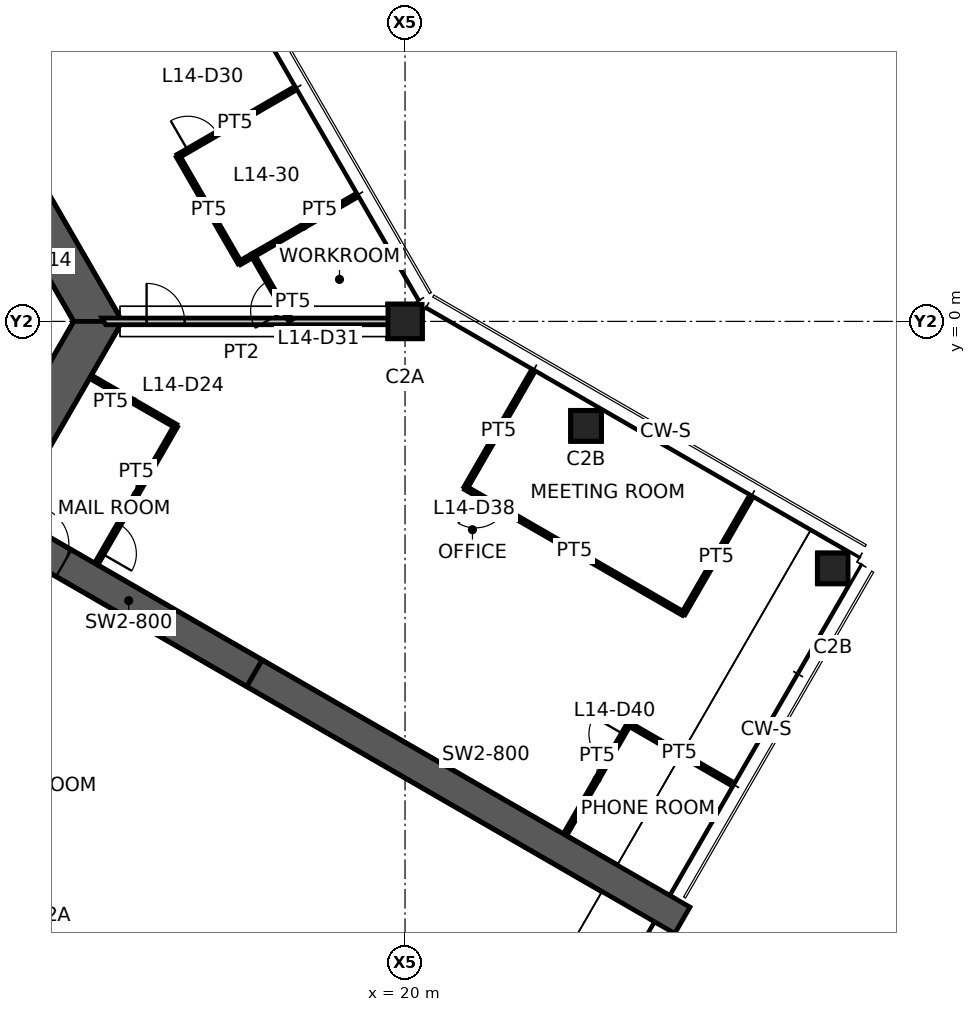
"""IFC4 building model, lengths in metres.
Left out: names, types, materials, properties, quantities, classifications, styles, units other than length and angle.
Written with IfcOpenShell. Run it as: python <this file> out.ifc"""

import sys

from ifc_helpers import new_model, si_unit, direction, frame, frame_2d, origin, origin_2d, place, context, subcontext, project, spatial, polyline, rectangle, hollow_rectangle, outline, extrude, element, fill, save


model = new_model("IFC4")
c1 = context("Model", 3, precision=1e-05, world=origin(), true_north=direction((0.0, 1.0)))
c2 = subcontext(c1, "Body", "Model", "MODEL_VIEW")
j1 = project(units=[si_unit("LENGTHUNIT", "METRE"), si_unit("PLANEANGLEUNIT", "RADIAN")], contexts=[c1])
p1 = place(None, origin())
s1 = spatial("IfcSite", under=j1, at=p1, CompositionType="ELEMENT")
p2 = place(p1, origin())
s2 = spatial("IfcBuilding", under=s1, at=p2, CompositionType="ELEMENT")
p3 = place(p2, frame((0.0, 0.0, 57.0)))
s3 = spatial("IfcBuildingStorey", under=s2, at=p3, CompositionType="ELEMENT", Elevation=57.0)
p4 = place(p3, frame((20.0, 0.0, 0.0), z_axis=(0.0, 0.0, 1.0), x_axis=(1.0, 0.0, 0.0)))
e1 = element("IfcColumn", 1, at=p4, inside=s3, PredefinedType="COLUMN", context=c2, shape_type="SweptSolid", body=[
    extrude(hollow_rectangle(XDim=0.9, YDim=0.9, WallThickness=0.055, at=origin_2d()), origin(), (0.0, 0.0, 1.0), 4.2),
])
for number, where, z_axis, x_axis in (
    (2, (24.763, -2.75, 0.0), (0.0, 0.0, 1.0), (1.0, 0.0, 0.0)),
    (3, (31.258, -6.5, 0.0), (0.0, 0.0, 1.0), (1.0, 0.0, 0.0)),
):
    element("IfcColumn", number, at=place(p3, frame(where, z_axis=z_axis, x_axis=x_axis)), inside=s3, PredefinedType="COLUMN", context=c2, shape_type="SweptSolid", body=[
        extrude(hollow_rectangle(XDim=0.8, YDim=0.8, WallThickness=0.045, at=origin_2d()), origin(), (0.0, 0.0, 1.0), 4.2),
    ])
p5 = place(p3, frame((11.922, 0.0, 0.0), z_axis=(0.0, 0.0, 1.0), x_axis=(-0.500004296715, 0.866022923061, 0.0)))
e4 = element("IfcWall", 4, at=p5, inside=s3, PredefinedType="SHEAR", context=c2, shape_type="SweptSolid", body=[
    extrude(outline(polyline([(-0.318, -0.55), (5.835, -0.55), (6.635, -0.55), (12.24, -0.55), (11.605, 0.55), (6.635, 0.55), (5.835, 0.55), (0.318, 0.55), (-0.318, -0.55)])), origin(), (0.0, 0.0, 1.0), 4.2),
])
p6 = place(p5, frame((5.835, 0.0, 0.0)))
e5 = element("IfcOpeningElement", 5, at=p6, cuts=e4, PredefinedType="OPENING", context=c2, shape_type="SweptSolid", body=[
    extrude(rectangle(XDim=0.8, YDim=2.1, at=frame_2d((0.4, 1.05))), frame((0.0, 0.56, 0.0), z_axis=(0.0, -1.0, 0.0), x_axis=(1.0, 0.0, 0.0)), (0.0, 0.0, 1.0), 1.12),
])
p7 = place(p3, frame((5.961, -10.325, 0.0), z_axis=(0.0, 0.0, 1.0), x_axis=(0.500004296715, 0.866022923061, 0.0)))
e6 = element("IfcWall", 6, at=p7, inside=s3, PredefinedType="SHEAR", context=c2, shape_type="SweptSolid", body=[
    extrude(outline(polyline([(-0.318, -0.55), (4.594, -0.55), (5.394, -0.55), (12.24, -0.55), (11.605, 0.55), (5.394, 0.55), (4.594, 0.55), (0.318, 0.55), (-0.318, -0.55)])), origin(), (0.0, 0.0, 1.0), 4.2),
])
p8 = place(p7, frame((4.594, 0.0, 0.0)))
e7 = element("IfcOpeningElement", 7, at=p8, cuts=e6, PredefinedType="OPENING", context=c2, shape_type="SweptSolid", body=[
    extrude(rectangle(XDim=0.8, YDim=2.1, at=frame_2d((0.4, 1.05))), frame((0.0, 0.56, 0.0), z_axis=(0.0, -1.0, 0.0), x_axis=(1.0, 0.0, 0.0)), (0.0, 0.0, 1.0), 1.12),
])
p9 = place(p3, frame((9.418, -5.438, 0.0), z_axis=(0.0, 0.0, 1.0), x_axis=(0.866029782078, -0.499992416496, 0.0)))
e8 = element("IfcWall", 8, at=p9, inside=s3, PredefinedType="SHEAR", context=c2, shape_type="SweptSolid", body=[
    extrude(rectangle(XDim=7.646, YDim=0.8, at=frame_2d((3.823, 0.0))), origin(), (0.0, 0.0, 1.0), 4.2),
])
p10 = place(p9, frame((0.85, 0.0, 0.0)))
e9 = element("IfcOpeningElement", 9, at=p10, cuts=e8, PredefinedType="OPENING", context=c2, shape_type="SweptSolid", body=[
    extrude(rectangle(XDim=1.0, YDim=2.1, at=frame_2d((0.5, 1.05))), frame((0.0, 0.41, 0.0), z_axis=(0.0, -1.0, 0.0), x_axis=(1.0, 0.0, 0.0)), (0.0, 0.0, 1.0), 0.82),
])
p11 = place(p3, frame((16.039, -9.26, 0.0), z_axis=(0.0, 0.0, 1.0), x_axis=(0.866024837091, -0.50000098154, 0.0)))
e10 = element("IfcWall", 10, at=p11, inside=s3, PredefinedType="SHEAR", context=c2, shape_type="SweptSolid", body=[
    extrude(rectangle(XDim=13.0, YDim=0.8, at=frame_2d((6.5, 0.0))), origin(), (0.0, 0.0, 1.0), 4.2),
])
p12 = place(p3, frame((12.072, 0.0, 0.0), z_axis=(0.0, 0.0, 1.0), x_axis=(1.0, 0.0, 0.0)))
e11 = element("IfcWall", 11, at=p12, inside=s3, PredefinedType="PARTITIONING", context=c2, shape_type="SweptSolid", body=[
    extrude(outline(polyline([(0.051, -0.087), (1.127, -0.087), (2.127, -0.087), (7.928, -0.087), (7.928, 0.087), (2.127, 0.087), (1.127, 0.087), (-0.051, 0.087), (0.051, -0.087)])), origin(), (0.0, 0.0, 1.0), 3.35),
])
p13 = place(p12, frame((1.127, 0.0, 0.0)))
e12 = element("IfcOpeningElement", 12, at=p13, cuts=e11, PredefinedType="OPENING", context=c2, shape_type="SweptSolid", body=[
    extrude(rectangle(XDim=1.0, YDim=2.1, at=frame_2d((0.5, 1.05))), frame((0.0, 0.098, 0.0), z_axis=(0.0, -1.0, 0.0), x_axis=(1.0, 0.0, 0.0)), (0.0, 0.0, 1.0), 0.195),
])
p14 = place(p3, frame((11.143, 8.05, 0.0), z_axis=(0.0, 0.0, 1.0), x_axis=(-0.86603494908, -0.499983466698, 0.0)))
e13 = element("IfcWall", 13, at=p14, inside=s3, PredefinedType="PARTITIONING", context=c2, shape_type="SweptSolid", body=[
    extrude(rectangle(XDim=2.78, YDim=0.1, at=frame_2d((1.39, 0.0))), origin(), (0.0, 0.0, 1.0), 3.25),
])
p15 = place(p3, frame((18.662, 3.277, 0.0), z_axis=(0.0, 0.0, 1.0), x_axis=(-0.866023484601, -0.500003324108, 0.0)))
e14 = element("IfcWall", 14, at=p15, inside=s3, PredefinedType="PARTITIONING", context=c2, shape_type="SweptSolid", body=[
    extrude(rectangle(XDim=3.085, YDim=0.1, at=frame_2d((1.542, 0.0))), origin(), (0.0, 0.0, 1.0), 3.25),
])
p16 = place(p3, frame((14.025, 4.349, 0.0), z_axis=(0.0, 0.0, 1.0), x_axis=(0.866043818878, 0.499968102766, 0.0)))
e15 = element("IfcWall", 15, at=p16, inside=s3, PredefinedType="PARTITIONING", context=c2, shape_type="SweptSolid", body=[
    extrude(rectangle(XDim=3.47, YDim=0.1, at=frame_2d((1.735, 0.0))), origin(), (0.0, 0.0, 1.0), 3.25),
])
p17 = place(p16, frame((0.3, 0.0, 0.0)))
e16 = element("IfcOpeningElement", 16, at=p17, cuts=e15, PredefinedType="OPENING", context=c2, shape_type="SweptSolid", body=[
    extrude(rectangle(XDim=0.9, YDim=2.1, at=frame_2d((0.45, 1.05))), frame((0.0, 0.06, 0.0), z_axis=(0.0, -1.0, 0.0), x_axis=(1.0, 0.0, 0.0)), (0.0, 0.0, 1.0), 0.12),
])
p18 = place(p3, frame((15.648, 1.537, 0.0), z_axis=(0.0, 0.0, 1.0), x_axis=(-0.499956811548, 0.866050337213, 0.0)))
e17 = element("IfcWall", 17, at=p18, inside=s3, PredefinedType="PARTITIONING", context=c2, shape_type="SweptSolid", body=[
    extrude(rectangle(XDim=3.246, YDim=0.1, at=frame_2d((1.623, 0.0))), origin(), (0.0, 0.0, 1.0), 3.25),
])
p19 = place(p3, frame((15.999, 1.74, 0.0), z_axis=(0.0, 0.0, 1.0), x_axis=(-0.866155438336, -0.499774705883, 0.0)))
e18 = element("IfcWall", 18, at=p19, inside=s3, PredefinedType="PARTITIONING", context=c2, shape_type="SweptSolid", body=[
    extrude(rectangle(XDim=0.405, YDim=0.1, at=frame_2d((0.202, 0.0))), origin(), (0.0, 0.0, 1.0), 3.25),
])
p20 = place(p3, frame((16.986, 0.02, 0.0), z_axis=(0.0, 0.0, 1.0), x_axis=(-0.498033854503, 0.867157586468, 0.0)))
e19 = element("IfcWall", 19, at=p20, inside=s3, PredefinedType="PARTITIONING", context=c2, shape_type="SweptSolid", body=[
    extrude(rectangle(XDim=1.983, YDim=0.1, at=frame_2d((0.991, 0.0))), origin(), (0.0, 0.0, 1.0), 3.25),
])
p21 = place(p20, frame((0.3, 0.0, 0.0)))
e20 = element("IfcOpeningElement", 20, at=p21, cuts=e19, PredefinedType="OPENING", context=c2, shape_type="SweptSolid", body=[
    extrude(rectangle(XDim=0.9, YDim=2.1, at=frame_2d((0.45, 1.05))), frame((0.0, 0.06, 0.0), z_axis=(0.0, -1.0, 0.0), x_axis=(1.0, 0.0, 0.0)), (0.0, 0.0, 1.0), 0.12),
])
p22 = place(p3, frame((21.592, -4.383, 0.0), z_axis=(0.0, 0.0, 1.0), x_axis=(0.500009906705, 0.86601968407, 0.0)))
e21 = element("IfcWall", 21, at=p22, inside=s3, PredefinedType="PARTITIONING", context=c2, shape_type="SweptSolid", body=[
    extrude(rectangle(XDim=3.48, YDim=0.1, at=frame_2d((1.74, 0.0))), origin(), (0.0, 0.0, 1.0), 3.25),
])
p23 = place(p3, frame((27.325, -7.693, 0.0), z_axis=(0.0, 0.0, 1.0), x_axis=(-0.866021597574, 0.500006592492, 0.0)))
e22 = element("IfcWall", 22, at=p23, inside=s3, PredefinedType="PARTITIONING", context=c2, shape_type="SweptSolid", body=[
    extrude(rectangle(XDim=6.62, YDim=0.1, at=frame_2d((3.31, 0.0))), origin(), (0.0, 0.0, 1.0), 3.25),
])
p24 = place(p23, frame((5.42, 0.0, 0.0)))
e23 = element("IfcOpeningElement", 23, at=p24, cuts=e22, PredefinedType="OPENING", context=c2, shape_type="SweptSolid", body=[
    extrude(rectangle(XDim=0.9, YDim=2.1, at=frame_2d((0.45, 1.05))), frame((0.0, 0.06, 0.0), z_axis=(0.0, -1.0, 0.0), x_axis=(1.0, 0.0, 0.0)), (0.0, 0.0, 1.0), 0.12),
])
p25 = place(p3, frame((29.06, -4.688, 0.0), z_axis=(0.0, 0.0, 1.0), x_axis=(-0.500020871164, -0.866013353477, 0.0)))
e24 = element("IfcWall", 24, at=p25, inside=s3, PredefinedType="PARTITIONING", context=c2, shape_type="SweptSolid", body=[
    extrude(rectangle(XDim=3.47, YDim=0.1, at=frame_2d((1.735, 0.0))), origin(), (0.0, 0.0, 1.0), 3.25),
])
p26 = place(p3, frame((11.735, -1.464, 0.0), z_axis=(0.0, 0.0, 1.0), x_axis=(0.866021702275, -0.500006411147, 0.0)))
e25 = element("IfcWall", 25, at=p26, inside=s3, PredefinedType="PARTITIONING", context=c2, shape_type="SweptSolid", body=[
    extrude(rectangle(XDim=2.58, YDim=0.1, at=frame_2d((1.29, 0.0))), origin(), (0.0, 0.0, 1.0), 3.25),
])
p27 = place(p3, frame((13.97, -2.754, 0.0), z_axis=(0.0, 0.0, 1.0), x_axis=(-0.499801669165, -0.866139879869, 0.0)))
e26 = element("IfcWall", 26, at=p27, inside=s3, PredefinedType="PARTITIONING", context=c2, shape_type="SweptSolid", body=[
    extrude(rectangle(XDim=4.18, YDim=0.1, at=frame_2d((2.09, 0.0))), origin(), (0.0, 0.0, 1.0), 3.25),
])
p28 = place(p27, frame((2.98, 0.0, 0.0)))
e27 = element("IfcOpeningElement", 27, at=p28, cuts=e26, PredefinedType="OPENING", context=c2, shape_type="SweptSolid", body=[
    extrude(rectangle(XDim=0.9, YDim=2.1, at=frame_2d((0.45, 1.05))), frame((0.0, 0.06, 0.0), z_axis=(0.0, -1.0, 0.0), x_axis=(1.0, 0.0, 0.0)), (0.0, 0.0, 1.0), 0.12),
])
p29 = place(p3, frame((24.217, -13.497, 0.0), z_axis=(0.0, 0.0, 1.0), x_axis=(0.499928740635, 0.866066541489, 0.0)))
e28 = element("IfcWall", 28, at=p29, inside=s3, PredefinedType="PARTITIONING", context=c2, shape_type="SweptSolid", body=[
    extrude(rectangle(XDim=3.347, YDim=0.1, at=frame_2d((1.673, 0.0))), origin(), (0.0, 0.0, 1.0), 3.25),
])
p30 = place(p29, frame((2.147, 0.0, 0.0)))
e29 = element("IfcOpeningElement", 29, at=p30, cuts=e28, PredefinedType="OPENING", context=c2, shape_type="SweptSolid", body=[
    extrude(rectangle(XDim=0.9, YDim=2.1, at=frame_2d((0.45, 1.05))), frame((0.0, 0.06, 0.0), z_axis=(0.0, -1.0, 0.0), x_axis=(1.0, 0.0, 0.0)), (0.0, 0.0, 1.0), 0.12),
])
p31 = place(p3, frame((25.89, -10.598, 0.0), z_axis=(0.0, 0.0, 1.0), x_axis=(0.866002828817, -0.500039098953, 0.0)))
e30 = element("IfcWall", 30, at=p31, inside=s3, PredefinedType="PARTITIONING", context=c2, shape_type="SweptSolid", body=[
    extrude(rectangle(XDim=3.07, YDim=0.1, at=frame_2d((1.535, 0.0))), origin(), (0.0, 0.0, 1.0), 3.25),
])
p32 = place(p10, origin())
e31 = element("IfcDoor", 31, at=p32, inside=s3, OperationType="SINGLE_SWING_LEFT", PredefinedType="DOOR", context=c2, shape_type="SweptSolid", body=[
    extrude(rectangle(XDim=1.0, YDim=2.1, at=frame_2d((0.5, 1.05))), frame((0.0, 0.025, 0.0), z_axis=(0.0, -1.0, 0.0), x_axis=(1.0, 0.0, 0.0)), (0.0, 0.0, 1.0), 0.05),
])
fill(e9, e31)
p33 = place(p13, origin())
e32 = element("IfcDoor", 32, at=p33, inside=s3, OperationType="SINGLE_SWING_LEFT", PredefinedType="DOOR", context=c2, shape_type="SweptSolid", body=[
    extrude(rectangle(XDim=1.0, YDim=2.1, at=frame_2d((0.5, 1.05))), frame((0.0, 0.025, 0.0), z_axis=(0.0, -1.0, 0.0), x_axis=(1.0, 0.0, 0.0)), (0.0, 0.0, 1.0), 0.05),
])
fill(e12, e32)
p34 = place(p17, origin())
e33 = element("IfcDoor", 33, at=p34, inside=s3, OperationType="SINGLE_SWING_LEFT", PredefinedType="DOOR", context=c2, shape_type="SweptSolid", body=[
    extrude(rectangle(XDim=0.9, YDim=2.1, at=frame_2d((0.45, 1.05))), frame((0.0, 0.025, 0.0), z_axis=(0.0, -1.0, 0.0), x_axis=(1.0, 0.0, 0.0)), (0.0, 0.0, 1.0), 0.05),
])
fill(e16, e33)
p35 = place(p21, origin())
e34 = element("IfcDoor", 34, at=p35, inside=s3, OperationType="SINGLE_SWING_LEFT", PredefinedType="DOOR", context=c2, shape_type="SweptSolid", body=[
    extrude(rectangle(XDim=0.9, YDim=2.1, at=frame_2d((0.45, 1.05))), frame((0.0, 0.025, 0.0), z_axis=(0.0, -1.0, 0.0), x_axis=(1.0, 0.0, 0.0)), (0.0, 0.0, 1.0), 0.05),
])
fill(e20, e34)
p36 = place(p24, origin())
e35 = element("IfcDoor", 35, at=p36, inside=s3, OperationType="SINGLE_SWING_RIGHT", PredefinedType="DOOR", context=c2, shape_type="SweptSolid", body=[
    extrude(rectangle(XDim=0.9, YDim=2.1, at=frame_2d((0.45, 1.05))), frame((0.0, 0.025, 0.0), z_axis=(0.0, -1.0, 0.0), x_axis=(1.0, 0.0, 0.0)), (0.0, 0.0, 1.0), 0.05),
])
fill(e23, e35)
p37 = place(p28, origin())
e36 = element("IfcDoor", 36, at=p37, inside=s3, OperationType="SINGLE_SWING_RIGHT", PredefinedType="DOOR", context=c2, shape_type="SweptSolid", body=[
    extrude(rectangle(XDim=0.9, YDim=2.1, at=frame_2d((0.45, 1.05))), frame((0.0, 0.025, 0.0), z_axis=(0.0, -1.0, 0.0), x_axis=(1.0, 0.0, 0.0)), (0.0, 0.0, 1.0), 0.05),
])
fill(e27, e36)
p38 = place(p30, origin())
e37 = element("IfcDoor", 37, at=p38, inside=s3, OperationType="SINGLE_SWING_RIGHT", PredefinedType="DOOR", context=c2, shape_type="SweptSolid", body=[
    extrude(rectangle(XDim=0.9, YDim=2.1, at=frame_2d((0.45, 1.05))), frame((0.0, 0.025, 0.0), z_axis=(0.0, -1.0, 0.0), x_axis=(1.0, 0.0, 0.0)), (0.0, 0.0, 1.0), 0.05),
])
fill(e29, e37)
save(model, sys.argv[1])
